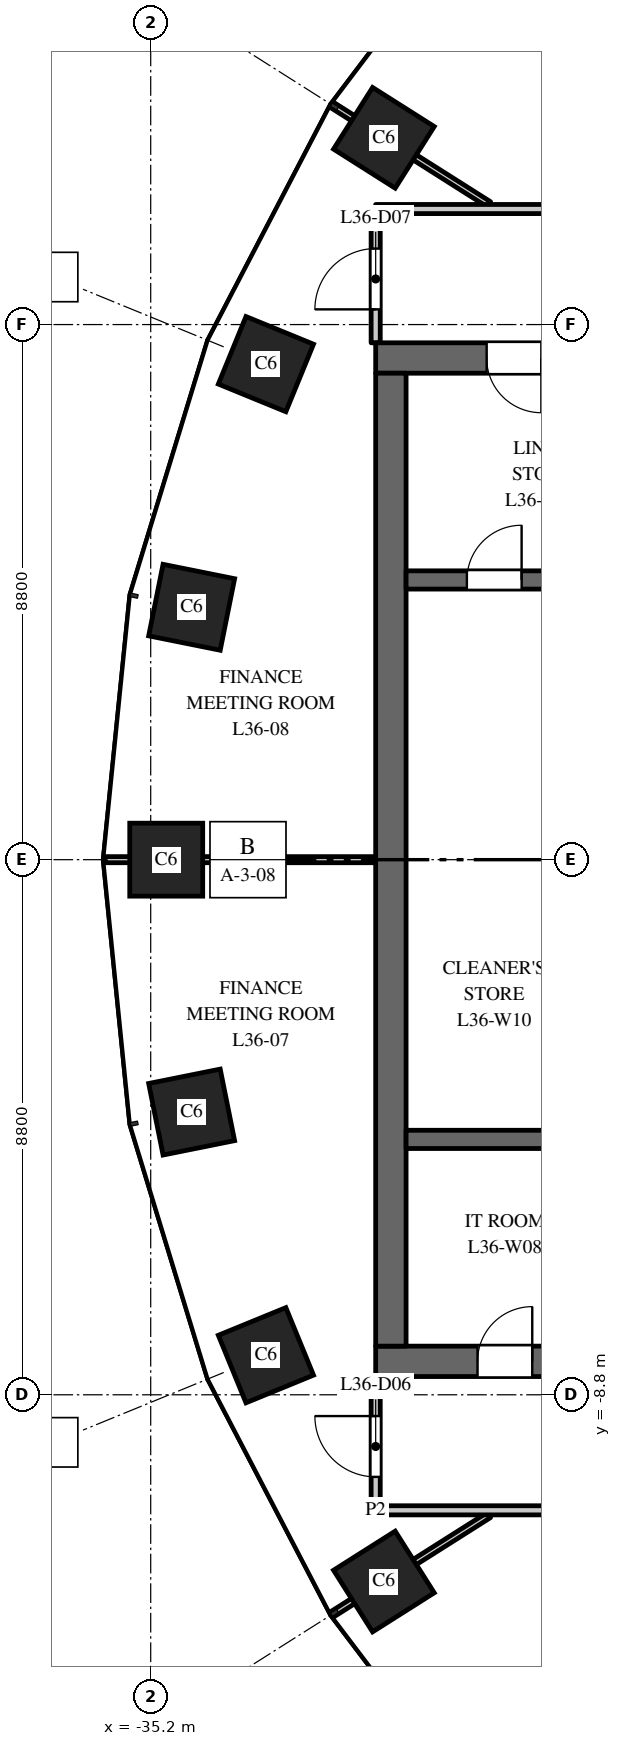
"""IFC4 building model, lengths in metres.
Left out: names, types, materials, properties, quantities, classifications, styles, units other than length and angle.
Written with IfcOpenShell. Run it as: python <this file> out.ifc"""

import sys

from ifc_helpers import new_model, si_unit, direction, frame, frame_2d, origin, origin_2d, place, context, subcontext, project, spatial, rectangle, extrude, element, fill, save


model = new_model("IFC4")
c1 = context("Model", 3, precision=1e-05, world=origin(), true_north=direction((0.0, 1.0)))
c2 = subcontext(c1, "Body", "Model", "MODEL_VIEW")
j1 = project(units=[si_unit("LENGTHUNIT", "METRE"), si_unit("PLANEANGLEUNIT", "RADIAN")], contexts=[c1])
p1 = place(None, origin())
s1 = spatial("IfcSite", under=j1, at=p1, CompositionType="ELEMENT")
p2 = place(p1, origin())
s2 = spatial("IfcBuilding", under=s1, at=p2, CompositionType="ELEMENT")
p3 = place(p2, frame((0.0, 0.0, 158.0)))
s3 = spatial("IfcBuildingStorey", under=s2, at=p3, CompositionType="ELEMENT", Elevation=158.0)
for number, where, z_axis, x_axis in (
    (1, (-31.365, 11.871, 0.0), (0.0, 0.0, 1.0), (-0.535, -0.845, 0.0)),
    (2, (-33.305, 8.149, 0.0), (0.0, 0.0, 1.0), (-0.379, -0.925, 0.0)),
    (3, (-34.527, 4.151, 0.0), (0.0, 0.0, 1.0), (-0.197, -0.98, 0.0)),
    (4, (-34.945, 0.0, 0.0), (0.0, 0.0, 1.0), (0.0, -1.0, 0.0)),
    (5, (-34.527, -4.151, 0.0), (0.0, 0.0, 1.0), (0.197, -0.98, 0.0)),
    (6, (-33.305, -8.149, 0.0), (0.0, 0.0, 1.0), (0.379, -0.925, 0.0)),
    (7, (-31.365, -11.871, 0.0), (0.0, 0.0, 1.0), (0.535, -0.845, 0.0)),
):
    element("IfcColumn", number, at=place(p3, frame(where, z_axis=z_axis, x_axis=x_axis)), inside=s3, PredefinedType="COLUMN", context=c2, shape_type="SweptSolid", body=[
        extrude(rectangle(XDim=1.2, YDim=1.2, at=origin_2d()), origin(), (0.0, 0.0, 1.0), 4.0),
    ])
p4 = place(p3, frame((-16.5, 8.25, 0.0), z_axis=(0.0, 0.0, 1.0), x_axis=(-1.0, 0.0, 0.0)))
e8 = element("IfcWall", 8, at=p4, inside=s3, PredefinedType="SHEAR", context=c2, shape_type="SweptSolid", body=[
    extrude(rectangle(XDim=15.0, YDim=0.5, at=frame_2d((7.5, 0.0))), origin(), (0.0, 0.0, 1.0), 3.7),
])
p5 = place(p4, frame((6.9, 0.0, 0.0)))
e9 = element("IfcOpeningElement", 9, at=p5, cuts=e8, PredefinedType="OPENING", context=c2, shape_type="SweptSolid", body=[
    extrude(rectangle(XDim=1.2, YDim=2.1, at=frame_2d((0.6, 1.05))), frame((0.0, 0.26, 0.0), z_axis=(0.0, -1.0, 0.0), x_axis=(1.0, 0.0, 0.0)), (0.0, 0.0, 1.0), 0.52),
])
p6 = place(p4, frame((12.275, 0.0, 0.0)))
e10 = element("IfcOpeningElement", 10, at=p6, cuts=e8, PredefinedType="OPENING", context=c2, shape_type="SweptSolid", body=[
    extrude(rectangle(XDim=0.9, YDim=2.1, at=frame_2d((0.45, 1.05))), frame((0.0, 0.26, 0.0), z_axis=(0.0, -1.0, 0.0), x_axis=(1.0, 0.0, 0.0)), (0.0, 0.0, 1.0), 0.52),
])
p7 = place(p3, frame((-16.5, -8.25, 0.0), z_axis=(0.0, 0.0, 1.0), x_axis=(-1.0, 0.0, 0.0)))
e11 = element("IfcWall", 11, at=p7, inside=s3, PredefinedType="SHEAR", context=c2, shape_type="SweptSolid", body=[
    extrude(rectangle(XDim=15.0, YDim=0.5, at=frame_2d((7.5, 0.0))), origin(), (0.0, 0.0, 1.0), 3.7),
])
p8 = place(p7, frame((6.9, 0.0, 0.0)))
e12 = element("IfcOpeningElement", 12, at=p8, cuts=e11, PredefinedType="OPENING", context=c2, shape_type="SweptSolid", body=[
    extrude(rectangle(XDim=1.2, YDim=2.1, at=frame_2d((0.6, 1.05))), frame((0.0, 0.26, 0.0), z_axis=(0.0, -1.0, 0.0), x_axis=(1.0, 0.0, 0.0)), (0.0, 0.0, 1.0), 0.52),
])
p9 = place(p7, frame((12.425, 0.0, 0.0)))
e13 = element("IfcOpeningElement", 13, at=p9, cuts=e11, PredefinedType="OPENING", context=c2, shape_type="SweptSolid", body=[
    extrude(rectangle(XDim=0.9, YDim=2.1, at=frame_2d((0.45, 1.05))), frame((0.0, 0.26, 0.0), z_axis=(0.0, -1.0, 0.0), x_axis=(1.0, 0.0, 0.0)), (0.0, 0.0, 1.0), 0.52),
])
p10 = place(p3, frame((-31.25, -8.0, 0.0), z_axis=(0.0, 0.0, 1.0), x_axis=(0.0, 1.0, 0.0)))
e14 = element("IfcWall", 14, at=p10, inside=s3, PredefinedType="SHEAR", context=c2, shape_type="SweptSolid", body=[
    extrude(rectangle(XDim=16.0, YDim=0.5, at=frame_2d((8.0, 0.0))), origin(), (0.0, 0.0, 1.0), 3.7),
])
p11 = place(p3, frame((-24.9, 4.6, 0.0), z_axis=(0.0, 0.0, 1.0), x_axis=(-1.0, 0.0, 0.0)))
e15 = element("IfcWall", 15, at=p11, inside=s3, PredefinedType="SHEAR", context=c2, shape_type="SweptSolid", body=[
    extrude(rectangle(XDim=6.1, YDim=0.3, at=frame_2d((3.05, 0.0))), origin(), (0.0, 0.0, 1.0), 3.7),
])
p12 = place(p11, frame((4.2, 0.0, 0.0)))
e16 = element("IfcOpeningElement", 16, at=p12, cuts=e15, PredefinedType="OPENING", context=c2, shape_type="SweptSolid", body=[
    extrude(rectangle(XDim=0.9, YDim=2.1, at=frame_2d((0.45, 1.05))), frame((0.0, 0.16, 0.0), z_axis=(0.0, -1.0, 0.0), x_axis=(1.0, 0.0, 0.0)), (0.0, 0.0, 1.0), 0.32),
])
p13 = place(p3, frame((-24.9, -4.6, 0.0), z_axis=(0.0, 0.0, 1.0), x_axis=(-1.0, 0.0, 0.0)))
e17 = element("IfcWall", 17, at=p13, inside=s3, PredefinedType="SHEAR", context=c2, shape_type="SweptSolid", body=[
    extrude(rectangle(XDim=6.1, YDim=0.3, at=frame_2d((3.05, 0.0))), origin(), (0.0, 0.0, 1.0), 3.7),
])
p14 = place(p3, frame((-35.949, 0.0, 0.0), z_axis=(0.0, 0.0, 1.0), x_axis=(1.0, 0.0, 0.0)))
e18 = element("IfcWall", 18, at=p14, inside=s3, PredefinedType="PARTITIONING", context=c2, shape_type="SweptSolid", body=[
    extrude(rectangle(XDim=4.449, YDim=0.1, at=frame_2d((2.225, 0.0))), origin(), (0.0, 0.0, 1.0), 2.9),
])
for number, where, z_axis, x_axis in (
    (19, (-32.212, -12.408, 0.0), (0.0, 0.0, 1.0), (0.845, 0.535, 0.0)),
    (20, (-32.212, 12.408, 0.0), (0.0, 0.0, 1.0), (0.845, -0.535, 0.0)),
):
    element("IfcWall", number, at=place(p3, frame(where, z_axis=z_axis, x_axis=x_axis)), inside=s3, PredefinedType="PARTITIONING", context=c2, shape_type="SweptSolid", body=[
        extrude(rectangle(XDim=3.048, YDim=0.1, at=frame_2d((1.524, 0.0))), origin(), (0.0, 0.0, 1.0), 3.7),
    ])
p15 = place(p3, frame((-31.5, -10.7, 0.0), z_axis=(0.0, 0.0, 1.0), x_axis=(0.0, 1.0, 0.0)))
e21 = element("IfcWall", 21, at=p15, inside=s3, PredefinedType="PARTITIONING", context=c2, shape_type="SweptSolid", body=[
    extrude(rectangle(XDim=2.2, YDim=0.15, at=frame_2d((1.1, 0.0))), origin(), (0.0, 0.0, 1.0), 3.7),
])
p16 = place(p15, frame((0.55, 0.0, 0.0)))
e22 = element("IfcOpeningElement", 22, at=p16, cuts=e21, PredefinedType="OPENING", context=c2, shape_type="SweptSolid", body=[
    extrude(rectangle(XDim=1.0, YDim=2.1, at=frame_2d((0.5, 1.05))), frame((0.0, 0.085, 0.0), z_axis=(0.0, -1.0, 0.0), x_axis=(1.0, 0.0, 0.0)), (0.0, 0.0, 1.0), 0.17),
])
p17 = place(p3, frame((-31.5, -10.7, 0.0), z_axis=(0.0, 0.0, 1.0), x_axis=(1.0, 0.0, 0.0)))
e23 = element("IfcWall", 23, at=p17, inside=s3, PredefinedType="PARTITIONING", context=c2, shape_type="SweptSolid", body=[
    extrude(rectangle(XDim=15.0, YDim=0.15, at=frame_2d((7.5, 0.0))), origin(), (0.0, 0.0, 1.0), 3.1),
])
p18 = place(p17, frame((4.379, 0.0, 0.0)))
e24 = element("IfcOpeningElement", 24, at=p18, cuts=e23, PredefinedType="OPENING", context=c2, shape_type="SweptSolid", body=[
    extrude(rectangle(XDim=1.0, YDim=2.1, at=frame_2d((0.5, 1.05))), frame((0.0, 0.085, 0.0), z_axis=(0.0, -1.0, 0.0), x_axis=(1.0, 0.0, 0.0)), (0.0, 0.0, 1.0), 0.17),
])
p19 = place(p17, frame((13.504, 0.0, 0.0)))
e25 = element("IfcOpeningElement", 25, at=p19, cuts=e23, PredefinedType="OPENING", context=c2, shape_type="SweptSolid", body=[
    extrude(rectangle(XDim=1.0, YDim=2.1, at=frame_2d((0.5, 1.05))), frame((0.0, 0.085, 0.0), z_axis=(0.0, -1.0, 0.0), x_axis=(1.0, 0.0, 0.0)), (0.0, 0.0, 1.0), 0.17),
])
p20 = place(p3, frame((-31.5, 8.5, 0.0), z_axis=(0.0, 0.0, 1.0), x_axis=(0.0, 1.0, 0.0)))
e26 = element("IfcWall", 26, at=p20, inside=s3, PredefinedType="PARTITIONING", context=c2, shape_type="SweptSolid", body=[
    extrude(rectangle(XDim=2.2, YDim=0.15, at=frame_2d((1.1, 0.0))), origin(), (0.0, 0.0, 1.0), 3.7),
])
p21 = place(p20, frame((0.55, 0.0, 0.0)))
e27 = element("IfcOpeningElement", 27, at=p21, cuts=e26, PredefinedType="OPENING", context=c2, shape_type="SweptSolid", body=[
    extrude(rectangle(XDim=1.0, YDim=2.1, at=frame_2d((0.5, 1.05))), frame((0.0, 0.085, 0.0), z_axis=(0.0, -1.0, 0.0), x_axis=(1.0, 0.0, 0.0)), (0.0, 0.0, 1.0), 0.17),
])
p22 = place(p3, frame((-31.5, 10.7, 0.0), z_axis=(0.0, 0.0, 1.0), x_axis=(1.0, 0.0, 0.0)))
e28 = element("IfcWall", 28, at=p22, inside=s3, PredefinedType="PARTITIONING", context=c2, shape_type="SweptSolid", body=[
    extrude(rectangle(XDim=15.0, YDim=0.15, at=frame_2d((7.5, 0.0))), origin(), (0.0, 0.0, 1.0), 3.1),
])
p23 = place(p22, frame((4.21, 0.0, 0.0)))
e29 = element("IfcOpeningElement", 29, at=p23, cuts=e28, PredefinedType="OPENING", context=c2, shape_type="SweptSolid", body=[
    extrude(rectangle(XDim=1.0, YDim=2.1, at=frame_2d((0.5, 1.05))), frame((0.0, 0.085, 0.0), z_axis=(0.0, -1.0, 0.0), x_axis=(1.0, 0.0, 0.0)), (0.0, 0.0, 1.0), 0.17),
])
p24 = place(p22, frame((13.35, 0.0, 0.0)))
e30 = element("IfcOpeningElement", 30, at=p24, cuts=e28, PredefinedType="OPENING", context=c2, shape_type="SweptSolid", body=[
    extrude(rectangle(XDim=1.0, YDim=2.1, at=frame_2d((0.5, 1.05))), frame((0.0, 0.085, 0.0), z_axis=(0.0, -1.0, 0.0), x_axis=(1.0, 0.0, 0.0)), (0.0, 0.0, 1.0), 0.17),
])
p25 = place(p6, origin())
e31 = element("IfcDoor", 31, at=p25, inside=s3, OperationType="SINGLE_SWING_RIGHT", PredefinedType="DOOR", context=c2, shape_type="SweptSolid", body=[
    extrude(rectangle(XDim=0.9, YDim=2.1, at=frame_2d((0.45, 1.05))), frame((0.0, 0.025, 0.0), z_axis=(0.0, -1.0, 0.0), x_axis=(1.0, 0.0, 0.0)), (0.0, 0.0, 1.0), 0.05),
])
fill(e10, e31)
p26 = place(p9, origin())
e32 = element("IfcDoor", 32, at=p26, inside=s3, OperationType="SINGLE_SWING_LEFT", PredefinedType="DOOR", context=c2, shape_type="SweptSolid", body=[
    extrude(rectangle(XDim=0.9, YDim=2.1, at=frame_2d((0.45, 1.05))), frame((0.0, 0.025, 0.0), z_axis=(0.0, -1.0, 0.0), x_axis=(1.0, 0.0, 0.0)), (0.0, 0.0, 1.0), 0.05),
])
fill(e13, e32)
p27 = place(p12, origin())
e33 = element("IfcDoor", 33, at=p27, inside=s3, OperationType="SINGLE_SWING_LEFT", PredefinedType="DOOR", context=c2, shape_type="SweptSolid", body=[
    extrude(rectangle(XDim=0.9, YDim=2.1, at=frame_2d((0.45, 1.05))), frame((0.0, 0.025, 0.0), z_axis=(0.0, -1.0, 0.0), x_axis=(1.0, 0.0, 0.0)), (0.0, 0.0, 1.0), 0.05),
])
fill(e16, e33)
p28 = place(p16, origin())
e34 = element("IfcDoor", 34, at=p28, inside=s3, OperationType="SINGLE_SWING_RIGHT", PredefinedType="DOOR", context=c2, shape_type="SweptSolid", body=[
    extrude(rectangle(XDim=1.0, YDim=2.1, at=frame_2d((0.5, 1.05))), frame((0.0, 0.025, 0.0), z_axis=(0.0, -1.0, 0.0), x_axis=(1.0, 0.0, 0.0)), (0.0, 0.0, 1.0), 0.05),
])
fill(e22, e34)
p29 = place(p21, origin())
e35 = element("IfcDoor", 35, at=p29, inside=s3, OperationType="SINGLE_SWING_LEFT", PredefinedType="DOOR", context=c2, shape_type="SweptSolid", body=[
    extrude(rectangle(XDim=1.0, YDim=2.1, at=frame_2d((0.5, 1.05))), frame((0.0, 0.025, 0.0), z_axis=(0.0, -1.0, 0.0), x_axis=(1.0, 0.0, 0.0)), (0.0, 0.0, 1.0), 0.05),
])
fill(e27, e35)
save(model, sys.argv[1])
